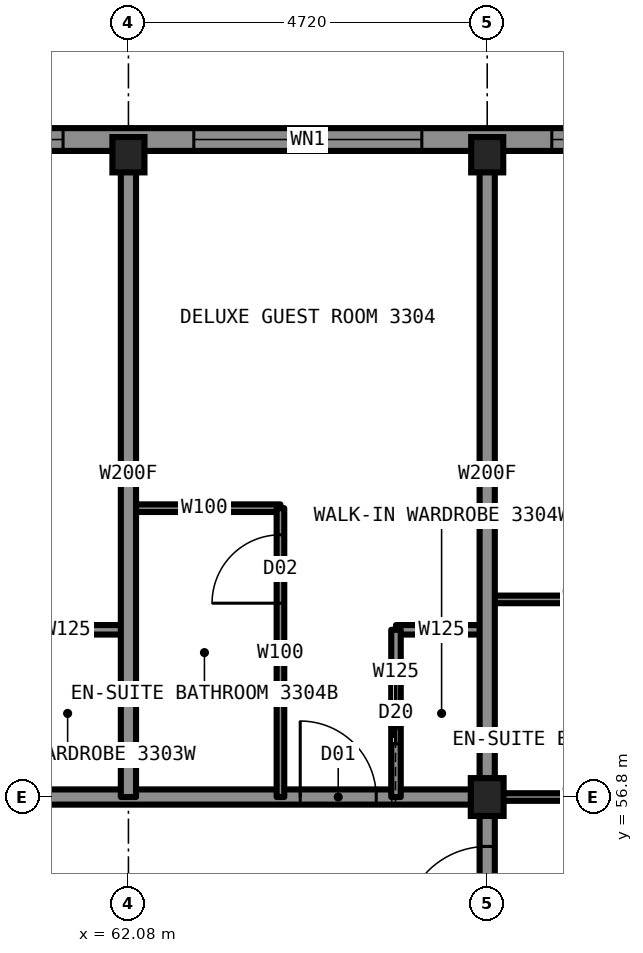
"""IFC4 building model, lengths in metres.
Left out: names, types, materials, properties, quantities, classifications, styles, units other than length and angle.
Written with IfcOpenShell. Run it as: python <this file> out.ifc"""

import sys

from ifc_helpers import new_model, si_unit, direction, frame, frame_2d, origin, origin_2d, place, context, subcontext, project, spatial, rectangle, i_section, extrude, element, fill, save


model = new_model("IFC4")
c1 = context("Model", 3, precision=1e-05, world=origin(), true_north=direction((0.0, 1.0)))
c2 = subcontext(c1, "Body", "Model", "MODEL_VIEW")
j1 = project(units=[si_unit("LENGTHUNIT", "METRE"), si_unit("PLANEANGLEUNIT", "RADIAN")], contexts=[c1])
p1 = place(None, origin())
s1 = spatial("IfcSite", under=j1, at=p1, CompositionType="ELEMENT")
p2 = place(p1, origin())
s2 = spatial("IfcBuilding", under=s1, at=p2, CompositionType="ELEMENT")
p3 = place(p2, frame((0.0, 0.0, 124.9)))
s3 = spatial("IfcBuildingStorey", under=s2, at=p3, CompositionType="ELEMENT", Elevation=124.9)
for number, where, z_axis, x_axis in (
    (1, (62.08, 65.25, 0.0), (0.0, 0.0, 1.0), (1.0, 0.0, 0.0)),
    (2, (66.8, 65.25, 0.0), (0.0, 0.0, 1.0), (1.0, 0.0, 0.0)),
):
    element("IfcColumn", number, at=place(p3, frame(where, z_axis=z_axis, x_axis=x_axis)), inside=s3, PredefinedType="COLUMN", context=c2, shape_type="SweptSolid", body=[
        extrude(i_section(OverallWidth=0.422, OverallDepth=0.465, WebThickness=0.045, FlangeThickness=0.073, at=origin_2d()), origin(), (0.0, 0.0, 1.0), 3.5),
    ])
p4 = place(p3, frame((66.8, 56.8, 0.0), z_axis=(0.0, 0.0, 1.0), x_axis=(1.0, 0.0, 0.0)))
e3 = element("IfcColumn", 3, at=p4, inside=s3, PredefinedType="COLUMN", context=c2, shape_type="SweptSolid", body=[
    extrude(i_section(OverallWidth=0.432, OverallDepth=0.498, WebThickness=0.056, FlangeThickness=0.089, at=origin_2d()), origin(), (0.0, 0.0, 1.0), 3.5),
])
p5 = place(p3, frame((66.8, 56.8, 0.0), z_axis=(0.0, 0.0, 1.0), x_axis=(1.0, 0.0, 0.0)))
e4 = element("IfcWall", 4, at=p5, inside=s3, PredefinedType="PARTITIONING", context=c2, shape_type="SweptSolid", body=[
    extrude(rectangle(XDim=2.6, YDim=0.1, at=frame_2d((1.3, 0.0))), origin(), (0.0, 0.0, 1.0), 2.573),
])
p6 = place(p3, frame((43.2, 56.8, 0.0), z_axis=(0.0, 0.0, 1.0), x_axis=(1.0, 0.0, 0.0)))
e5 = element("IfcWall", 5, at=p6, inside=s3, PredefinedType="PARTITIONING", context=c2, shape_type="SweptSolid", body=[
    extrude(rectangle(XDim=23.6, YDim=0.2, at=frame_2d((11.8, 0.0))), origin(), (0.0, 0.0, 1.0), 3.33),
])
p7 = place(p6, frame((0.7, 0.0, 0.0)))
e6 = element("IfcOpeningElement", 6, at=p7, cuts=e5, PredefinedType="OPENING", context=c2, shape_type="SweptSolid", body=[
    extrude(rectangle(XDim=1.0, YDim=2.2, at=frame_2d((0.5, 1.1))), frame((0.0, 0.11, 0.0), z_axis=(0.0, -1.0, 0.0), x_axis=(1.0, 0.0, 0.0)), (0.0, 0.0, 1.0), 0.22),
])
p8 = place(p6, frame((5.12, 0.0, 0.0)))
e7 = element("IfcOpeningElement", 7, at=p8, cuts=e5, PredefinedType="OPENING", context=c2, shape_type="SweptSolid", body=[
    extrude(rectangle(XDim=1.0, YDim=2.2, at=frame_2d((0.5, 1.1))), frame((0.0, 0.11, 0.0), z_axis=(0.0, -1.0, 0.0), x_axis=(1.0, 0.0, 0.0)), (0.0, 0.0, 1.0), 0.22),
])
p9 = place(p6, frame((12.44, 0.0, 0.0)))
e8 = element("IfcOpeningElement", 8, at=p9, cuts=e5, PredefinedType="OPENING", context=c2, shape_type="SweptSolid", body=[
    extrude(rectangle(XDim=1.0, YDim=2.2, at=frame_2d((0.5, 1.1))), frame((0.0, 0.11, 0.0), z_axis=(0.0, -1.0, 0.0), x_axis=(1.0, 0.0, 0.0)), (0.0, 0.0, 1.0), 0.22),
])
p10 = place(p6, frame((21.14, 0.0, 0.0)))
e9 = element("IfcOpeningElement", 9, at=p10, cuts=e5, PredefinedType="OPENING", context=c2, shape_type="SweptSolid", body=[
    extrude(rectangle(XDim=1.0, YDim=2.2, at=frame_2d((0.5, 1.1))), frame((0.0, 0.11, 0.0), z_axis=(0.0, -1.0, 0.0), x_axis=(1.0, 0.0, 0.0)), (0.0, 0.0, 1.0), 0.22),
])
p11 = place(p3, frame((60.48, 59.0, 0.0), z_axis=(0.0, 0.0, 1.0), x_axis=(1.0, 0.0, 0.0)))
e10 = element("IfcWall", 10, at=p11, inside=s3, PredefinedType="PARTITIONING", context=c2, shape_type="SweptSolid", body=[
    extrude(rectangle(XDim=1.6, YDim=0.125, at=frame_2d((0.8, 0.0))), origin(), (0.0, 0.0, 1.0), 3.33),
])
p12 = place(p3, frame((65.6, 59.0, 0.0), z_axis=(0.0, 0.0, 1.0), x_axis=(1.0, 0.0, 0.0)))
e11 = element("IfcWall", 11, at=p12, inside=s3, PredefinedType="PARTITIONING", context=c2, shape_type="SweptSolid", body=[
    extrude(rectangle(XDim=1.2, YDim=0.125, at=frame_2d((0.6, 0.0))), origin(), (0.0, 0.0, 1.0), 3.33),
])
p13 = place(p3, frame((66.8, 59.4, 0.0), z_axis=(0.0, 0.0, 1.0), x_axis=(1.0, 0.0, 0.0)))
e12 = element("IfcWall", 12, at=p13, inside=s3, PredefinedType="PARTITIONING", context=c2, shape_type="SweptSolid", body=[
    extrude(rectangle(XDim=2.6, YDim=0.1, at=frame_2d((1.3, 0.0))), origin(), (0.0, 0.0, 1.0), 3.33),
])
p14 = place(p3, frame((62.08, 60.6, 0.0), z_axis=(0.0, 0.0, 1.0), x_axis=(1.0, 0.0, 0.0)))
e13 = element("IfcWall", 13, at=p14, inside=s3, PredefinedType="PARTITIONING", context=c2, shape_type="SweptSolid", body=[
    extrude(rectangle(XDim=2.0, YDim=0.1, at=frame_2d((1.0, 0.0))), origin(), (0.0, 0.0, 1.0), 3.33),
])
p15 = place(p3, frame((65.6, 56.8, 0.0), z_axis=(0.0, 0.0, 1.0), x_axis=(0.0, 1.0, 0.0)))
e14 = element("IfcWall", 14, at=p15, inside=s3, PredefinedType="PARTITIONING", context=c2, shape_type="SweptSolid", body=[
    extrude(rectangle(XDim=2.2, YDim=0.125, at=frame_2d((1.1, 0.0))), origin(), (0.0, 0.0, 1.0), 3.33),
])
p16 = place(p15, frame((0.7, 0.0, 0.0)))
e15 = element("IfcOpeningElement", 15, at=p16, cuts=e14, PredefinedType="OPENING", context=c2, shape_type="SweptSolid", body=[
    extrude(rectangle(XDim=0.8, YDim=2.1, at=frame_2d((0.4, 1.05))), frame((0.0, 0.073, 0.0), z_axis=(0.0, -1.0, 0.0), x_axis=(1.0, 0.0, 0.0)), (0.0, 0.0, 1.0), 0.145),
])
p17 = place(p3, frame((66.8, 33.22, 0.0), z_axis=(0.0, 0.0, 1.0), x_axis=(0.0, 1.0, 0.0)))
e16 = element("IfcWall", 16, at=p17, inside=s3, PredefinedType="PARTITIONING", context=c2, shape_type="SweptSolid", body=[
    extrude(rectangle(XDim=23.58, YDim=0.2, at=frame_2d((11.79, 0.0))), origin(), (0.0, 0.0, 1.0), 3.33),
])
p18 = place(p17, frame((7.85, 0.0, 0.0)))
e17 = element("IfcOpeningElement", 17, at=p18, cuts=e16, PredefinedType="OPENING", context=c2, shape_type="SweptSolid", body=[
    extrude(rectangle(XDim=1.0, YDim=2.2, at=frame_2d((0.5, 1.1))), frame((0.0, 0.11, 0.0), z_axis=(0.0, -1.0, 0.0), x_axis=(1.0, 0.0, 0.0)), (0.0, 0.0, 1.0), 0.22),
])
p19 = place(p17, frame((12.42, 0.0, 0.0)))
e18 = element("IfcOpeningElement", 18, at=p19, cuts=e16, PredefinedType="OPENING", context=c2, shape_type="SweptSolid", body=[
    extrude(rectangle(XDim=1.0, YDim=2.2, at=frame_2d((0.5, 1.1))), frame((0.0, 0.11, 0.0), z_axis=(0.0, -1.0, 0.0), x_axis=(1.0, 0.0, 0.0)), (0.0, 0.0, 1.0), 0.22),
])
p20 = place(p17, frame((21.83, 0.0, 0.0)))
e19 = element("IfcOpeningElement", 19, at=p20, cuts=e16, PredefinedType="OPENING", context=c2, shape_type="SweptSolid", body=[
    extrude(rectangle(XDim=1.1, YDim=2.2, at=frame_2d((0.55, 1.1))), frame((0.0, 0.11, 0.0), z_axis=(0.0, -1.0, 0.0), x_axis=(1.0, 0.0, 0.0)), (0.0, 0.0, 1.0), 0.22),
])
p21 = place(p17, frame((0.63, 0.0, 0.0)))
e20 = element("IfcOpeningElement", 20, at=p21, cuts=e16, PredefinedType="OPENING", context=c2, shape_type="SweptSolid", body=[
    extrude(rectangle(XDim=1.1, YDim=2.2, at=frame_2d((0.55, 1.1))), frame((0.0, 0.11, 0.0), z_axis=(0.0, -1.0, 0.0), x_axis=(1.0, 0.0, 0.0)), (0.0, 0.0, 1.0), 0.22),
])
for number, where, z_axis, x_axis in (
    (21, (66.8, 56.8, 0.0), (0.0, 0.0, 1.0), (0.0, 1.0, 0.0)),
    (22, (62.08, 56.8, 0.0), (0.0, 0.0, 1.0), (0.0, 1.0, 0.0)),
):
    element("IfcWall", number, at=place(p3, frame(where, z_axis=z_axis, x_axis=x_axis)), inside=s3, PredefinedType="PARTITIONING", context=c2, shape_type="SweptSolid", body=[
        extrude(rectangle(XDim=8.5, YDim=0.2, at=frame_2d((4.25, 0.0))), origin(), (0.0, 0.0, 1.0), 2.573),
    ])
p22 = place(p3, frame((64.08, 56.8, 0.0), z_axis=(0.0, 0.0, 1.0), x_axis=(0.0, 1.0, 0.0)))
e23 = element("IfcWall", 23, at=p22, inside=s3, PredefinedType="PARTITIONING", context=c2, shape_type="SweptSolid", body=[
    extrude(rectangle(XDim=3.8, YDim=0.1, at=frame_2d((1.9, 0.0))), origin(), (0.0, 0.0, 1.0), 3.33),
])
p23 = place(p22, frame((2.55, 0.0, 0.0)))
e24 = element("IfcOpeningElement", 24, at=p23, cuts=e23, PredefinedType="OPENING", context=c2, shape_type="SweptSolid", body=[
    extrude(rectangle(XDim=0.9, YDim=2.1, at=frame_2d((0.45, 1.05))), frame((0.0, 0.06, 0.0), z_axis=(0.0, -1.0, 0.0), x_axis=(1.0, 0.0, 0.0)), (0.0, 0.0, 1.0), 0.12),
])
p24 = place(p3, frame((70.1, 65.45, 0.0), z_axis=(0.0, 0.0, 1.0), x_axis=(-1.0, 0.0, 0.0)))
e25 = element("IfcWall", 25, at=p24, inside=s3, PredefinedType="SOLIDWALL", context=c2, shape_type="SweptSolid", body=[
    extrude(rectangle(XDim=30.2, YDim=0.3, at=frame_2d((15.1, 0.0))), origin(), (0.0, 0.0, 1.0), 2.83),
])
p25 = place(p24, frame((0.85, 0.0, 0.5)))
e26 = element("IfcOpeningElement", 26, at=p25, cuts=e25, PredefinedType="OPENING", context=c2, shape_type="SweptSolid", body=[
    extrude(rectangle(XDim=1.6, YDim=2.0, at=frame_2d((0.8, 1.0))), frame((0.0, 0.16, 0.0), z_axis=(0.0, -1.0, 0.0), x_axis=(1.0, 0.0, 0.0)), (0.0, 0.0, 1.0), 0.32),
])
p26 = place(p24, frame((4.16, 0.0, 0.5)))
e27 = element("IfcOpeningElement", 27, at=p26, cuts=e25, PredefinedType="OPENING", context=c2, shape_type="SweptSolid", body=[
    extrude(rectangle(XDim=3.0, YDim=2.0, at=frame_2d((1.5, 1.0))), frame((0.0, 0.16, 0.0), z_axis=(0.0, -1.0, 0.0), x_axis=(1.0, 0.0, 0.0)), (0.0, 0.0, 1.0), 0.32),
])
p27 = place(p24, frame((8.88, 0.0, 0.5)))
e28 = element("IfcOpeningElement", 28, at=p27, cuts=e25, PredefinedType="OPENING", context=c2, shape_type="SweptSolid", body=[
    extrude(rectangle(XDim=3.0, YDim=2.0, at=frame_2d((1.5, 1.0))), frame((0.0, 0.16, 0.0), z_axis=(0.0, -1.0, 0.0), x_axis=(1.0, 0.0, 0.0)), (0.0, 0.0, 1.0), 0.32),
])
p28 = place(p24, frame((18.32, 0.0, 0.5)))
e29 = element("IfcOpeningElement", 29, at=p28, cuts=e25, PredefinedType="OPENING", context=c2, shape_type="SweptSolid", body=[
    extrude(rectangle(XDim=3.0, YDim=2.0, at=frame_2d((1.5, 1.0))), frame((0.0, 0.16, 0.0), z_axis=(0.0, -1.0, 0.0), x_axis=(1.0, 0.0, 0.0)), (0.0, 0.0, 1.0), 0.32),
])
p29 = place(p24, frame((23.04, 0.0, 0.5)))
e30 = element("IfcOpeningElement", 30, at=p29, cuts=e25, PredefinedType="OPENING", context=c2, shape_type="SweptSolid", body=[
    extrude(rectangle(XDim=3.0, YDim=2.0, at=frame_2d((1.5, 1.0))), frame((0.0, 0.16, 0.0), z_axis=(0.0, -1.0, 0.0), x_axis=(1.0, 0.0, 0.0)), (0.0, 0.0, 1.0), 0.32),
])
p30 = place(p24, frame((27.75, 0.0, 0.5)))
e31 = element("IfcOpeningElement", 31, at=p30, cuts=e25, PredefinedType="OPENING", context=c2, shape_type="SweptSolid", body=[
    extrude(rectangle(XDim=1.6, YDim=2.0, at=frame_2d((0.8, 1.0))), frame((0.0, 0.16, 0.0), z_axis=(0.0, -1.0, 0.0), x_axis=(1.0, 0.0, 0.0)), (0.0, 0.0, 1.0), 0.32),
])
p31 = place(p10, origin())
e32 = element("IfcDoor", 32, at=p31, inside=s3, OperationType="SINGLE_SWING_LEFT", PredefinedType="DOOR", context=c2, shape_type="SweptSolid", body=[
    extrude(rectangle(XDim=1.0, YDim=2.2, at=frame_2d((0.5, 1.1))), frame((0.0, 0.025, 0.0), z_axis=(0.0, -1.0, 0.0), x_axis=(1.0, 0.0, 0.0)), (0.0, 0.0, 1.0), 0.05),
])
fill(e9, e32)
p32 = place(p23, origin())
e33 = element("IfcDoor", 33, at=p32, inside=s3, OperationType="SINGLE_SWING_RIGHT", PredefinedType="DOOR", context=c2, shape_type="SweptSolid", body=[
    extrude(rectangle(XDim=0.9, YDim=2.1, at=frame_2d((0.45, 1.05))), frame((0.0, 0.025, 0.0), z_axis=(0.0, -1.0, 0.0), x_axis=(1.0, 0.0, 0.0)), (0.0, 0.0, 1.0), 0.05),
])
fill(e24, e33)
p33 = place(p16, origin())
e34 = element("IfcDoor", 34, at=p33, inside=s3, OperationType="SLIDING_TO_LEFT", PredefinedType="DOOR", context=c2, shape_type="SweptSolid", body=[
    extrude(rectangle(XDim=0.8, YDim=2.1, at=frame_2d((0.4, 1.05))), frame((0.0, 0.025, 0.0), z_axis=(0.0, -1.0, 0.0), x_axis=(1.0, 0.0, 0.0)), (0.0, 0.0, 1.0), 0.05),
])
fill(e15, e34)
p34 = place(p20, origin())
e35 = element("IfcDoor", 35, at=p34, inside=s3, OperationType="SINGLE_SWING_LEFT", PredefinedType="DOOR", context=c2, shape_type="SweptSolid", body=[
    extrude(rectangle(XDim=1.1, YDim=2.2, at=frame_2d((0.55, 1.1))), frame((0.0, 0.025, 0.0), z_axis=(0.0, -1.0, 0.0), x_axis=(1.0, 0.0, 0.0)), (0.0, 0.0, 1.0), 0.05),
])
fill(e19, e35)
p35 = place(p25, origin())
e36 = element("IfcWindow", 36, at=p35, inside=s3, PartitioningType="SINGLE_PANEL", PredefinedType="WINDOW", context=c2, shape_type="SweptSolid", body=[
    extrude(rectangle(XDim=1.6, YDim=2.0, at=frame_2d((0.8, 1.0))), frame((0.0, 0.03, 0.0), z_axis=(0.0, -1.0, 0.0), x_axis=(1.0, 0.0, 0.0)), (0.0, 0.0, 1.0), 0.06),
])
fill(e26, e36)
p36 = place(p26, origin())
e37 = element("IfcWindow", 37, at=p36, inside=s3, PartitioningType="SINGLE_PANEL", PredefinedType="WINDOW", context=c2, shape_type="SweptSolid", body=[
    extrude(rectangle(XDim=3.0, YDim=2.0, at=frame_2d((1.5, 1.0))), frame((0.0, 0.03, 0.0), z_axis=(0.0, -1.0, 0.0), x_axis=(1.0, 0.0, 0.0)), (0.0, 0.0, 1.0), 0.06),
])
fill(e27, e37)
p37 = place(p27, origin())
e38 = element("IfcWindow", 38, at=p37, inside=s3, PartitioningType="SINGLE_PANEL", PredefinedType="WINDOW", context=c2, shape_type="SweptSolid", body=[
    extrude(rectangle(XDim=3.0, YDim=2.0, at=frame_2d((1.5, 1.0))), frame((0.0, 0.03, 0.0), z_axis=(0.0, -1.0, 0.0), x_axis=(1.0, 0.0, 0.0)), (0.0, 0.0, 1.0), 0.06),
])
fill(e28, e38)
save(model, sys.argv[1])
